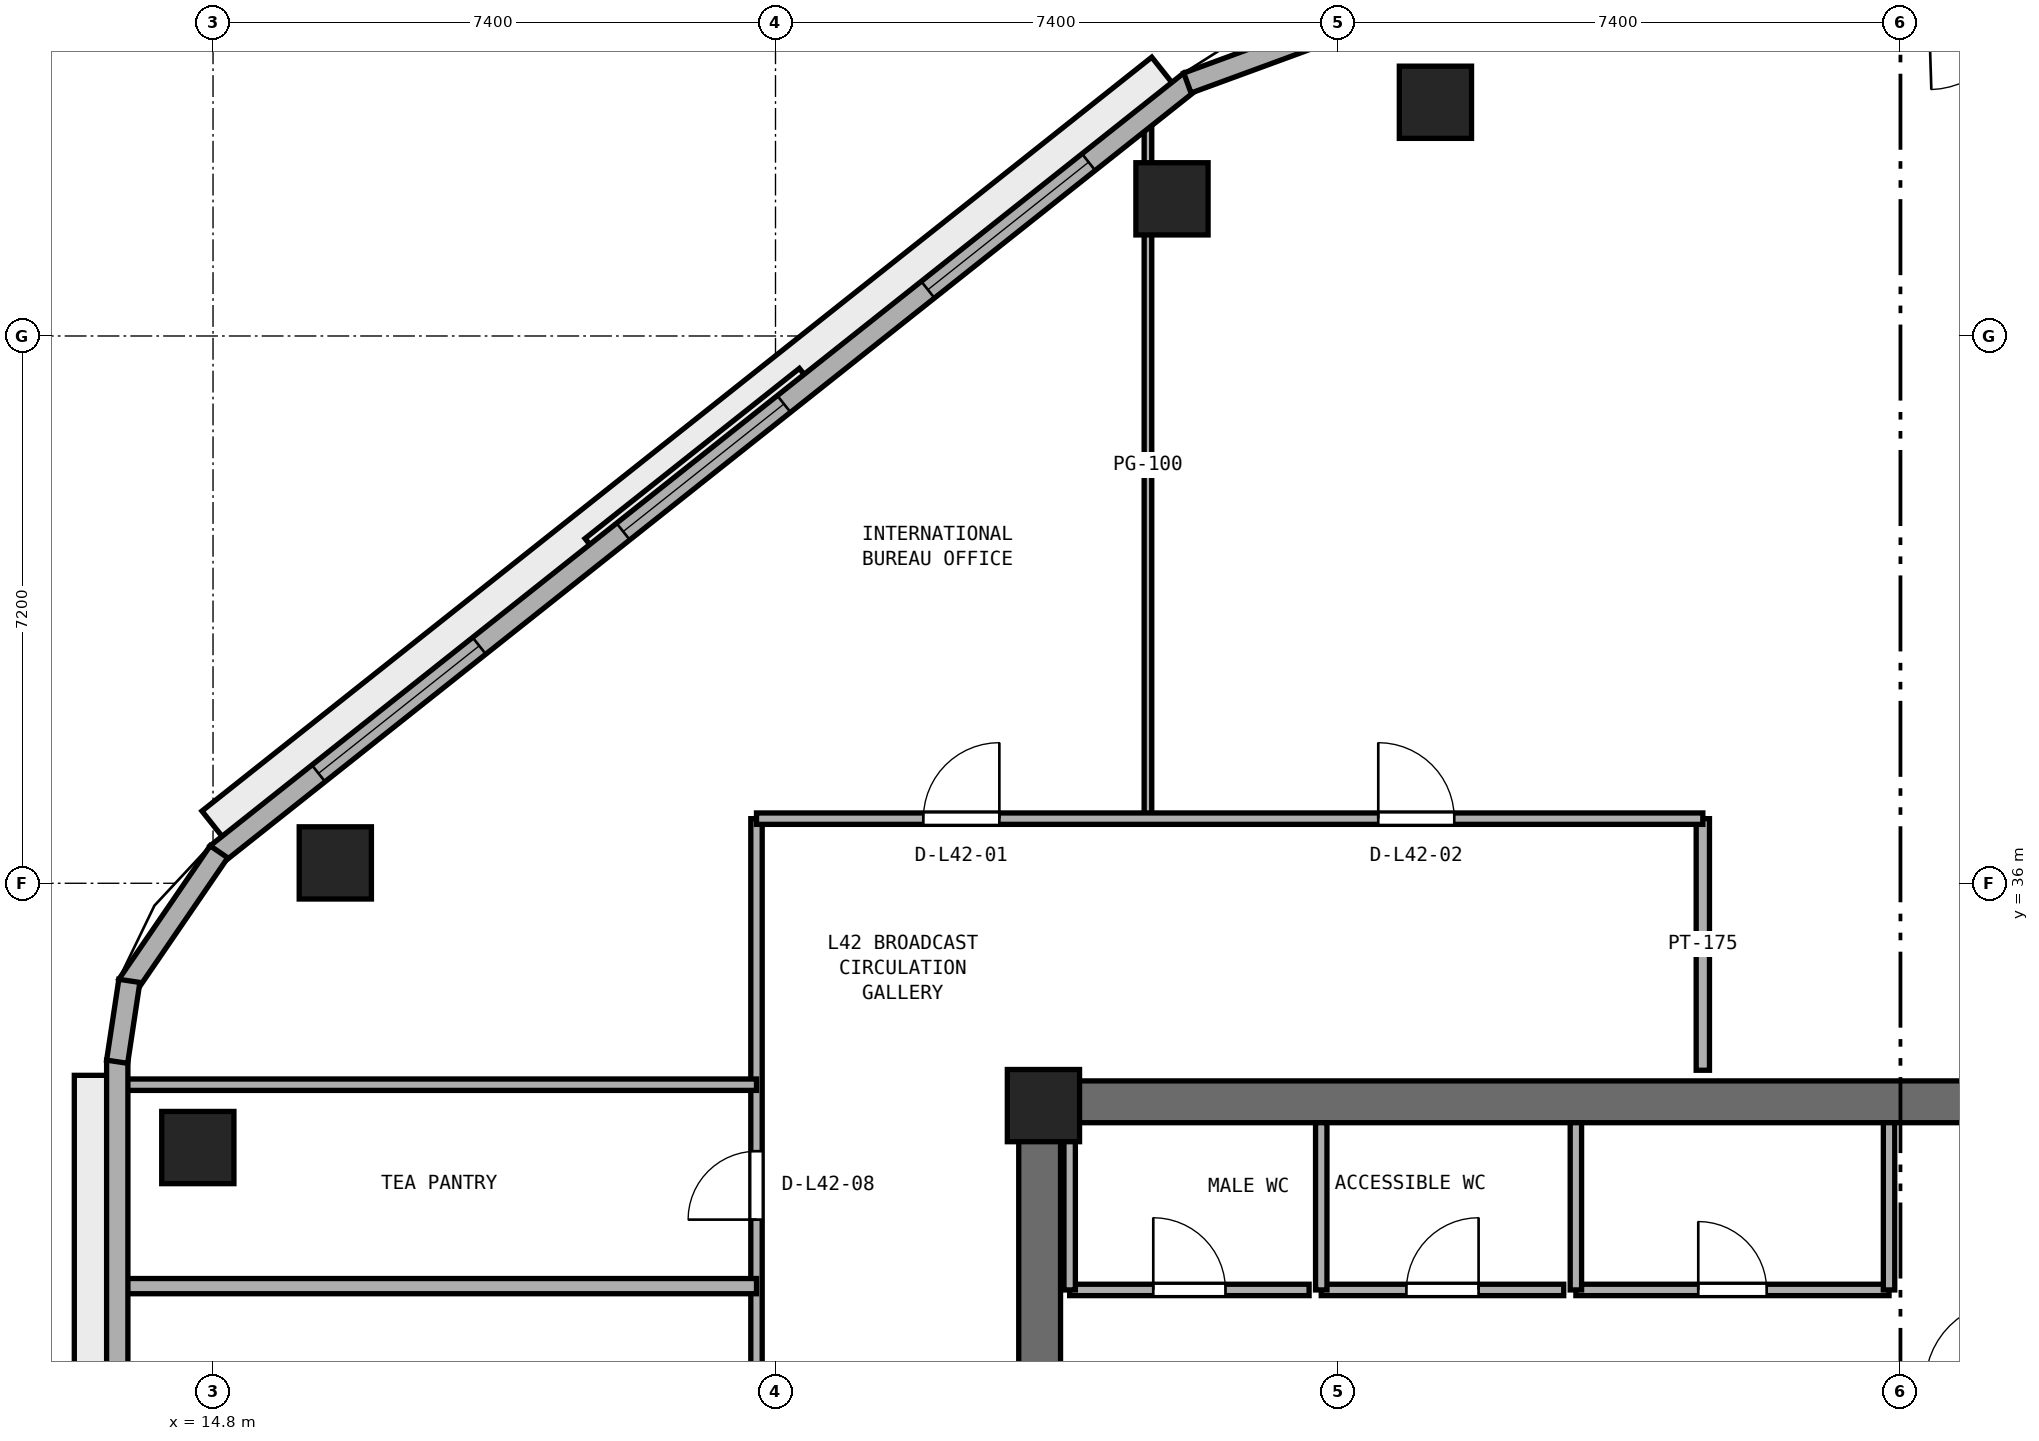
"""IFC4 building model, lengths in metres.
Left out: names, types, materials, properties, quantities, classifications, styles, units other than length and angle.
Written with IfcOpenShell. Run it as: python <this file> out.ifc"""

import sys

from ifc_helpers import new_model, si_unit, direction, frame, frame_2d, origin, origin_2d, place, context, subcontext, project, spatial, rectangle, extrude, element, fill, save


model = new_model("IFC4")
c1 = context("Model", 3, precision=1e-05, world=origin(), true_north=direction((0.0, 1.0)))
c2 = subcontext(c1, "Body", "Model", "MODEL_VIEW")
j1 = project(units=[si_unit("LENGTHUNIT", "METRE"), si_unit("PLANEANGLEUNIT", "RADIAN")], contexts=[c1])
p1 = place(None, origin())
s1 = spatial("IfcSite", under=j1, at=p1, CompositionType="ELEMENT")
p2 = place(p1, origin())
s2 = spatial("IfcBuilding", under=s1, at=p2, CompositionType="ELEMENT")
p3 = place(p2, frame((0.0, 0.0, 166.8)))
s3 = spatial("IfcBuildingStorey", under=s2, at=p3, CompositionType="ELEMENT", Elevation=166.8)
p4 = place(p3, frame((25.4, 33.125, 0.0), z_axis=(0.0, 0.0, 1.0), x_axis=(1.0, 0.0, 0.0)))
e1 = element("IfcWall", 1, at=p4, inside=s3, PredefinedType="SHEAR", context=c2, shape_type="SweptSolid", body=[
    extrude(rectangle(XDim=23.2, YDim=0.55, at=frame_2d((11.6, 0.0))), origin(), (0.0, 0.0, 1.0), 3.54),
])
p5 = place(p3, frame((25.675, 17.55, 0.0), z_axis=(0.0, 0.0, 1.0), x_axis=(0.0, 1.0, 0.0)))
e2 = element("IfcWall", 2, at=p5, inside=s3, PredefinedType="SHEAR", context=c2, shape_type="SweptSolid", body=[
    extrude(rectangle(XDim=15.3, YDim=0.55, at=frame_2d((7.65, 0.0))), origin(), (0.0, 0.0, 1.0), 3.54),
])
p6 = place(p5, frame((6.9, 0.0, 0.0)))
e3 = element("IfcOpeningElement", 3, at=p6, cuts=e2, PredefinedType="OPENING", context=c2, shape_type="SweptSolid", body=[
    extrude(rectangle(XDim=1.5, YDim=2.15, at=frame_2d((0.75, 1.075))), frame((0.0, 0.285, 0.0), z_axis=(0.0, -1.0, 0.0), x_axis=(1.0, 0.0, 0.0)), (0.0, 0.0, 1.0), 0.57),
])
p7 = place(p3, frame((25.725, 33.075, 0.0), z_axis=(0.0, 0.0, 1.0), x_axis=(1.0, 0.0, 0.0)))
e4 = element("IfcColumn", 4, at=p7, inside=s3, PredefinedType="PILASTER", context=c2, shape_type="SweptSolid", body=[
    extrude(rectangle(XDim=0.95, YDim=0.95, at=origin_2d()), origin(), (0.0, 0.0, 1.0), 3.8),
])
for number, where, z_axis, x_axis in (
    (5, (30.882, 46.275, 0.0), (0.0, 0.0, 1.0), (1.0, 0.0, 0.0)),
    (6, (27.416, 45.004, 0.0), (0.0, 0.0, 1.0), (1.0, 0.0, 0.0)),
    (7, (16.409, 36.268, 0.0), (0.0, 0.0, 1.0), (1.0, 0.0, 0.0)),
    (8, (14.6, 32.523, 0.0), (0.0, 0.0, 1.0), (1.0, 0.0, 0.0)),
):
    element("IfcColumn", number, at=place(p3, frame(where, z_axis=z_axis, x_axis=x_axis)), inside=s3, PredefinedType="COLUMN", context=c2, shape_type="SweptSolid", body=[
        extrude(rectangle(XDim=0.95, YDim=0.95, at=origin_2d()), origin(), (0.0, 0.0, 1.0), 3.8),
    ])
p8 = place(p3, frame((26.07, 30.65, 0.0), z_axis=(0.0, 0.0, 1.0), x_axis=(1.0, 0.0, 0.0)))
e9 = element("IfcWall", 9, at=p8, inside=s3, PredefinedType="PARTITIONING", context=c2, shape_type="SweptSolid", body=[
    extrude(rectangle(XDim=3.15, YDim=0.15, at=frame_2d((1.575, 0.0))), origin(), (0.0, 0.0, 1.0), 3.54),
])
p9 = place(p8, frame((1.1, 0.0, 0.0)))
e10 = element("IfcOpeningElement", 10, at=p9, cuts=e9, PredefinedType="OPENING", context=c2, shape_type="SweptSolid", body=[
    extrude(rectangle(XDim=0.95, YDim=2.1, at=frame_2d((0.475, 1.05))), frame((0.0, 0.085, 0.0), z_axis=(0.0, -1.0, 0.0), x_axis=(1.0, 0.0, 0.0)), (0.0, 0.0, 1.0), 0.17),
])
p10 = place(p3, frame((26.07, 30.65, 0.0), z_axis=(0.0, 0.0, 1.0), x_axis=(0.0, 1.0, 0.0)))
e11 = element("IfcWall", 11, at=p10, inside=s3, PredefinedType="PARTITIONING", context=c2, shape_type="SweptSolid", body=[
    extrude(rectangle(XDim=2.2, YDim=0.15, at=frame_2d((1.1, 0.0))), origin(), (0.0, 0.0, 1.0), 2.64),
])
p11 = place(p3, frame((29.38, 30.65, 0.0), z_axis=(0.0, 0.0, 1.0), x_axis=(1.0, 0.0, 0.0)))
e12 = element("IfcWall", 12, at=p11, inside=s3, PredefinedType="PARTITIONING", context=c2, shape_type="SweptSolid", body=[
    extrude(rectangle(XDim=3.19, YDim=0.15, at=frame_2d((1.595, 0.0))), origin(), (0.0, 0.0, 1.0), 3.54),
])
p12 = place(p11, frame((1.12, 0.0, 0.0)))
e13 = element("IfcOpeningElement", 13, at=p12, cuts=e12, PredefinedType="OPENING", context=c2, shape_type="SweptSolid", body=[
    extrude(rectangle(XDim=0.95, YDim=2.1, at=frame_2d((0.475, 1.05))), frame((0.0, 0.085, 0.0), z_axis=(0.0, -1.0, 0.0), x_axis=(1.0, 0.0, 0.0)), (0.0, 0.0, 1.0), 0.17),
])
p13 = place(p3, frame((29.38, 30.65, 0.0), z_axis=(0.0, 0.0, 1.0), x_axis=(0.0, 1.0, 0.0)))
e14 = element("IfcWall", 14, at=p13, inside=s3, PredefinedType="PARTITIONING", context=c2, shape_type="SweptSolid", body=[
    extrude(rectangle(XDim=2.2, YDim=0.15, at=frame_2d((1.1, 0.0))), origin(), (0.0, 0.0, 1.0), 3.54),
])
p14 = place(p3, frame((32.73, 30.65, 0.0), z_axis=(0.0, 0.0, 1.0), x_axis=(1.0, 0.0, 0.0)))
e15 = element("IfcWall", 15, at=p14, inside=s3, PredefinedType="PARTITIONING", context=c2, shape_type="SweptSolid", body=[
    extrude(rectangle(XDim=4.12, YDim=0.15, at=frame_2d((2.06, 0.0))), origin(), (0.0, 0.0, 1.0), 3.54),
])
p15 = place(p14, frame((1.61, 0.0, 0.0)))
e16 = element("IfcOpeningElement", 16, at=p15, cuts=e15, PredefinedType="OPENING", context=c2, shape_type="SweptSolid", body=[
    extrude(rectangle(XDim=0.9, YDim=2.1, at=frame_2d((0.45, 1.05))), frame((0.0, 0.085, 0.0), z_axis=(0.0, -1.0, 0.0), x_axis=(1.0, 0.0, 0.0)), (0.0, 0.0, 1.0), 0.17),
])
for number, where, z_axis, x_axis in (
    (17, (32.73, 30.65, 0.0), (0.0, 0.0, 1.0), (0.0, 1.0, 0.0)),
    (18, (36.85, 30.65, 0.0), (0.0, 0.0, 1.0), (0.0, 1.0, 0.0)),
):
    element("IfcWall", number, at=place(p3, frame(where, z_axis=z_axis, x_axis=x_axis)), inside=s3, PredefinedType="PARTITIONING", context=c2, shape_type="SweptSolid", body=[
        extrude(rectangle(XDim=2.2, YDim=0.15, at=frame_2d((1.1, 0.0))), origin(), (0.0, 0.0, 1.0), 3.54),
    ])
p16 = place(p3, frame((34.4, 33.54, 0.0), z_axis=(0.0, 0.0, 1.0), x_axis=(0.0, 1.0, 0.0)))
e19 = element("IfcWall", 19, at=p16, inside=s3, PredefinedType="PARTITIONING", context=c2, shape_type="SweptSolid", body=[
    extrude(rectangle(XDim=3.31, YDim=0.175, at=frame_2d((1.655, 0.0))), origin(), (0.0, 0.0, 1.0), 3.54),
])
p17 = place(p3, frame((27.1, 36.85, 0.0), z_axis=(0.0, 0.0, 1.0), x_axis=(0.0, 1.0, 0.0)))
e20 = element("IfcWall", 20, at=p17, inside=s3, PredefinedType="PARTITIONING", context=c2, shape_type="SweptSolid", body=[
    extrude(rectangle(XDim=9.295, YDim=0.1, at=frame_2d((4.648, 0.0))), origin(), (0.0, 0.0, 1.0), 3.54),
])
p18 = place(p3, frame((21.95, 26.55, 0.0), z_axis=(0.0, 0.0, 1.0), x_axis=(0.0, 1.0, 0.0)))
e21 = element("IfcWall", 21, at=p18, inside=s3, PredefinedType="PARTITIONING", context=c2, shape_type="SweptSolid", body=[
    extrude(rectangle(XDim=10.3, YDim=0.15, at=frame_2d((5.15, 0.0))), origin(), (0.0, 0.0, 1.0), 3.54),
])
p19 = place(p18, frame((5.025, 0.0, 0.0)))
e22 = element("IfcOpeningElement", 22, at=p19, cuts=e21, PredefinedType="OPENING", context=c2, shape_type="SweptSolid", body=[
    extrude(rectangle(XDim=0.9, YDim=2.1, at=frame_2d((0.45, 1.05))), frame((0.0, 0.085, 0.0), z_axis=(0.0, -1.0, 0.0), x_axis=(1.0, 0.0, 0.0)), (0.0, 0.0, 1.0), 0.17),
])
p20 = place(p3, frame((13.605, 30.7, 0.0), z_axis=(0.0, 0.0, 1.0), x_axis=(1.0, 0.0, 0.0)))
e23 = element("IfcWall", 23, at=p20, inside=s3, PredefinedType="PARTITIONING", context=c2, shape_type="SweptSolid", body=[
    extrude(rectangle(XDim=8.345, YDim=0.2, at=frame_2d((4.172, 0.0))), origin(), (0.0, 0.0, 1.0), 3.54),
])
p21 = place(p3, frame((13.605, 33.35, 0.0), z_axis=(0.0, 0.0, 1.0), x_axis=(1.0, 0.0, 0.0)))
e24 = element("IfcWall", 24, at=p21, inside=s3, PredefinedType="PARTITIONING", context=c2, shape_type="SweptSolid", body=[
    extrude(rectangle(XDim=8.345, YDim=0.15, at=frame_2d((4.172, 0.0))), origin(), (0.0, 0.0, 1.0), 3.54),
])
p22 = place(p3, frame((21.95, 36.85, 0.0), z_axis=(0.0, 0.0, 1.0), x_axis=(1.0, 0.0, 0.0)))
e25 = element("IfcWall", 25, at=p22, inside=s3, PredefinedType="PARTITIONING", context=c2, shape_type="SweptSolid", body=[
    extrude(rectangle(XDim=12.45, YDim=0.15, at=frame_2d((6.225, 0.0))), origin(), (0.0, 0.0, 1.0), 3.54),
])
p23 = place(p22, frame((2.195, 0.0, 0.0)))
e26 = element("IfcOpeningElement", 26, at=p23, cuts=e25, PredefinedType="OPENING", context=c2, shape_type="SweptSolid", body=[
    extrude(rectangle(XDim=1.0, YDim=2.12, at=frame_2d((0.5, 1.06))), frame((0.0, 0.085, 0.0), z_axis=(0.0, -1.0, 0.0), x_axis=(1.0, 0.0, 0.0)), (0.0, 0.0, 1.0), 0.17),
])
p24 = place(p22, frame((8.18, 0.0, 0.0)))
e27 = element("IfcOpeningElement", 27, at=p24, cuts=e25, PredefinedType="OPENING", context=c2, shape_type="SweptSolid", body=[
    extrude(rectangle(XDim=1.0, YDim=2.12, at=frame_2d((0.5, 1.06))), frame((0.0, 0.085, 0.0), z_axis=(0.0, -1.0, 0.0), x_axis=(1.0, 0.0, 0.0)), (0.0, 0.0, 1.0), 0.17),
])
p25 = place(p3, frame((27.658, 46.55, 0.0), z_axis=(0.0, 0.0, 1.0), x_axis=(-0.783266285861, -0.621686356158, 0.0)))
e28 = element("IfcWall", 28, at=p25, inside=s3, PredefinedType="STANDARD", context=c2, shape_type="SweptSolid", body=[
    extrude(rectangle(XDim=16.353, YDim=0.28, at=frame_2d((8.177, 0.0))), origin(), (0.0, 0.0, 1.0), 3.54),
])
p26 = place(p25, frame((1.709, 0.0, 0.9)))
e29 = element("IfcOpeningElement", 29, at=p26, cuts=e28, PredefinedType="OPENING", context=c2, shape_type="SweptSolid", body=[
    extrude(rectangle(XDim=2.7, YDim=1.75, at=frame_2d((1.35, 0.875))), frame((0.0, 0.15, 0.0), z_axis=(0.0, -1.0, 0.0), x_axis=(1.0, 0.0, 0.0)), (0.0, 0.0, 1.0), 0.3),
])
p27 = place(p25, frame((6.826, 0.0, 0.9)))
e30 = element("IfcOpeningElement", 30, at=p27, cuts=e28, PredefinedType="OPENING", context=c2, shape_type="SweptSolid", body=[
    extrude(rectangle(XDim=2.7, YDim=1.75, at=frame_2d((1.35, 0.875))), frame((0.0, 0.15, 0.0), z_axis=(0.0, -1.0, 0.0), x_axis=(1.0, 0.0, 0.0)), (0.0, 0.0, 1.0), 0.3),
])
p28 = place(p25, frame((11.944, 0.0, 0.9)))
e31 = element("IfcOpeningElement", 31, at=p28, cuts=e28, PredefinedType="OPENING", context=c2, shape_type="SweptSolid", body=[
    extrude(rectangle(XDim=2.7, YDim=1.75, at=frame_2d((1.35, 0.875))), frame((0.0, 0.15, 0.0), z_axis=(0.0, -1.0, 0.0), x_axis=(1.0, 0.0, 0.0)), (0.0, 0.0, 1.0), 0.3),
])
p29 = place(p3, frame((13.54, 33.673, 0.0), z_axis=(0.0, 0.0, 1.0), x_axis=(0.0, -1.0, 0.0)))
e32 = element("IfcWall", 32, at=p29, inside=s3, PredefinedType="STANDARD", context=c2, shape_type="SweptSolid", body=[
    extrude(rectangle(XDim=17.751, YDim=0.28, at=frame_2d((8.875, 0.0))), origin(), (0.0, 0.0, 1.0), 3.54),
])
p30 = place(p29, frame((13.109, 0.0, 0.9)))
e33 = element("IfcOpeningElement", 33, at=p30, cuts=e32, PredefinedType="OPENING", context=c2, shape_type="SweptSolid", body=[
    extrude(rectangle(XDim=2.7, YDim=1.75, at=frame_2d((1.35, 0.875))), frame((0.0, 0.15, 0.0), z_axis=(0.0, -1.0, 0.0), x_axis=(1.0, 0.0, 0.0)), (0.0, 0.0, 1.0), 0.3),
])
p31 = place(p3, frame((29.743, 47.306, 0.0), z_axis=(0.0, 0.0, 1.0), x_axis=(-0.93893328381, -0.344099242302, 0.0)))
e34 = element("IfcWall", 34, at=p31, inside=s3, PredefinedType="STANDARD", context=c2, shape_type="SweptSolid", body=[
    extrude(rectangle(XDim=2.262, YDim=0.28, at=frame_2d((1.131, 0.0))), origin(), (0.0, 0.0, 1.0), 3.54),
])
p32 = place(p3, frame((14.878, 36.414, 0.0), z_axis=(0.0, 0.0, 1.0), x_axis=(-0.564564614133, -0.825388875906, 0.0)))
e35 = element("IfcWall", 35, at=p32, inside=s3, PredefinedType="STANDARD", context=c2, shape_type="SweptSolid", body=[
    extrude(rectangle(XDim=2.128, YDim=0.28, at=frame_2d((1.064, 0.0))), origin(), (0.0, 0.0, 1.0), 3.54),
])
p33 = place(p3, frame((13.699, 34.716, 0.0), z_axis=(0.0, 0.0, 1.0), x_axis=(-0.149549920187, -0.988754176412, 0.0)))
e36 = element("IfcWall", 36, at=p33, inside=s3, PredefinedType="STANDARD", context=c2, shape_type="SweptSolid", body=[
    extrude(rectangle(XDim=1.076, YDim=0.28, at=frame_2d((0.538, 0.0))), origin(), (0.0, 0.0, 1.0), 3.54),
])
p34 = place(p9, origin())
e37 = element("IfcDoor", 37, at=p34, inside=s3, OperationType="SINGLE_SWING_LEFT", PredefinedType="DOOR", context=c2, shape_type="SweptSolid", body=[
    extrude(rectangle(XDim=0.95, YDim=2.1, at=frame_2d((0.475, 1.05))), frame((0.0, 0.025, 0.0), z_axis=(0.0, -1.0, 0.0), x_axis=(1.0, 0.0, 0.0)), (0.0, 0.0, 1.0), 0.05),
])
fill(e10, e37)
p35 = place(p12, origin())
e38 = element("IfcDoor", 38, at=p35, inside=s3, OperationType="SINGLE_SWING_RIGHT", PredefinedType="DOOR", context=c2, shape_type="SweptSolid", body=[
    extrude(rectangle(XDim=0.95, YDim=2.1, at=frame_2d((0.475, 1.05))), frame((0.0, 0.025, 0.0), z_axis=(0.0, -1.0, 0.0), x_axis=(1.0, 0.0, 0.0)), (0.0, 0.0, 1.0), 0.05),
])
fill(e13, e38)
p36 = place(p15, origin())
e39 = element("IfcDoor", 39, at=p36, inside=s3, OperationType="SINGLE_SWING_LEFT", PredefinedType="DOOR", context=c2, shape_type="SweptSolid", body=[
    extrude(rectangle(XDim=0.9, YDim=2.1, at=frame_2d((0.45, 1.05))), frame((0.0, 0.025, 0.0), z_axis=(0.0, -1.0, 0.0), x_axis=(1.0, 0.0, 0.0)), (0.0, 0.0, 1.0), 0.05),
])
fill(e16, e39)
p37 = place(p23, origin())
e40 = element("IfcDoor", 40, at=p37, inside=s3, OperationType="SINGLE_SWING_RIGHT", PredefinedType="DOOR", context=c2, shape_type="SweptSolid", body=[
    extrude(rectangle(XDim=1.0, YDim=2.12, at=frame_2d((0.5, 1.06))), frame((0.0, 0.025, 0.0), z_axis=(0.0, -1.0, 0.0), x_axis=(1.0, 0.0, 0.0)), (0.0, 0.0, 1.0), 0.05),
])
fill(e26, e40)
p38 = place(p24, origin())
e41 = element("IfcDoor", 41, at=p38, inside=s3, OperationType="SINGLE_SWING_LEFT", PredefinedType="DOOR", context=c2, shape_type="SweptSolid", body=[
    extrude(rectangle(XDim=1.0, YDim=2.12, at=frame_2d((0.5, 1.06))), frame((0.0, 0.025, 0.0), z_axis=(0.0, -1.0, 0.0), x_axis=(1.0, 0.0, 0.0)), (0.0, 0.0, 1.0), 0.05),
])
fill(e27, e41)
p39 = place(p19, origin())
e42 = element("IfcDoor", 42, at=p39, inside=s3, OperationType="SINGLE_SWING_LEFT", PredefinedType="DOOR", context=c2, shape_type="SweptSolid", body=[
    extrude(rectangle(XDim=0.9, YDim=2.1, at=frame_2d((0.45, 1.05))), frame((0.0, 0.025, 0.0), z_axis=(0.0, -1.0, 0.0), x_axis=(1.0, 0.0, 0.0)), (0.0, 0.0, 1.0), 0.05),
])
fill(e22, e42)
p40 = place(p26, origin())
e43 = element("IfcWindow", 43, at=p40, inside=s3, PartitioningType="SINGLE_PANEL", PredefinedType="WINDOW", context=c2, shape_type="SweptSolid", body=[
    extrude(rectangle(XDim=2.7, YDim=1.75, at=frame_2d((1.35, 0.875))), frame((0.0, 0.03, 0.0), z_axis=(0.0, -1.0, 0.0), x_axis=(1.0, 0.0, 0.0)), (0.0, 0.0, 1.0), 0.06),
])
fill(e29, e43)
p41 = place(p27, origin())
e44 = element("IfcWindow", 44, at=p41, inside=s3, PartitioningType="SINGLE_PANEL", PredefinedType="WINDOW", context=c2, shape_type="SweptSolid", body=[
    extrude(rectangle(XDim=2.7, YDim=1.75, at=frame_2d((1.35, 0.875))), frame((0.0, 0.03, 0.0), z_axis=(0.0, -1.0, 0.0), x_axis=(1.0, 0.0, 0.0)), (0.0, 0.0, 1.0), 0.06),
])
fill(e30, e44)
p42 = place(p28, origin())
e45 = element("IfcWindow", 45, at=p42, inside=s3, PartitioningType="SINGLE_PANEL", PredefinedType="WINDOW", context=c2, shape_type="SweptSolid", body=[
    extrude(rectangle(XDim=2.7, YDim=1.75, at=frame_2d((1.35, 0.875))), frame((0.0, 0.03, 0.0), z_axis=(0.0, -1.0, 0.0), x_axis=(1.0, 0.0, 0.0)), (0.0, 0.0, 1.0), 0.06),
])
fill(e31, e45)
save(model, sys.argv[1])
